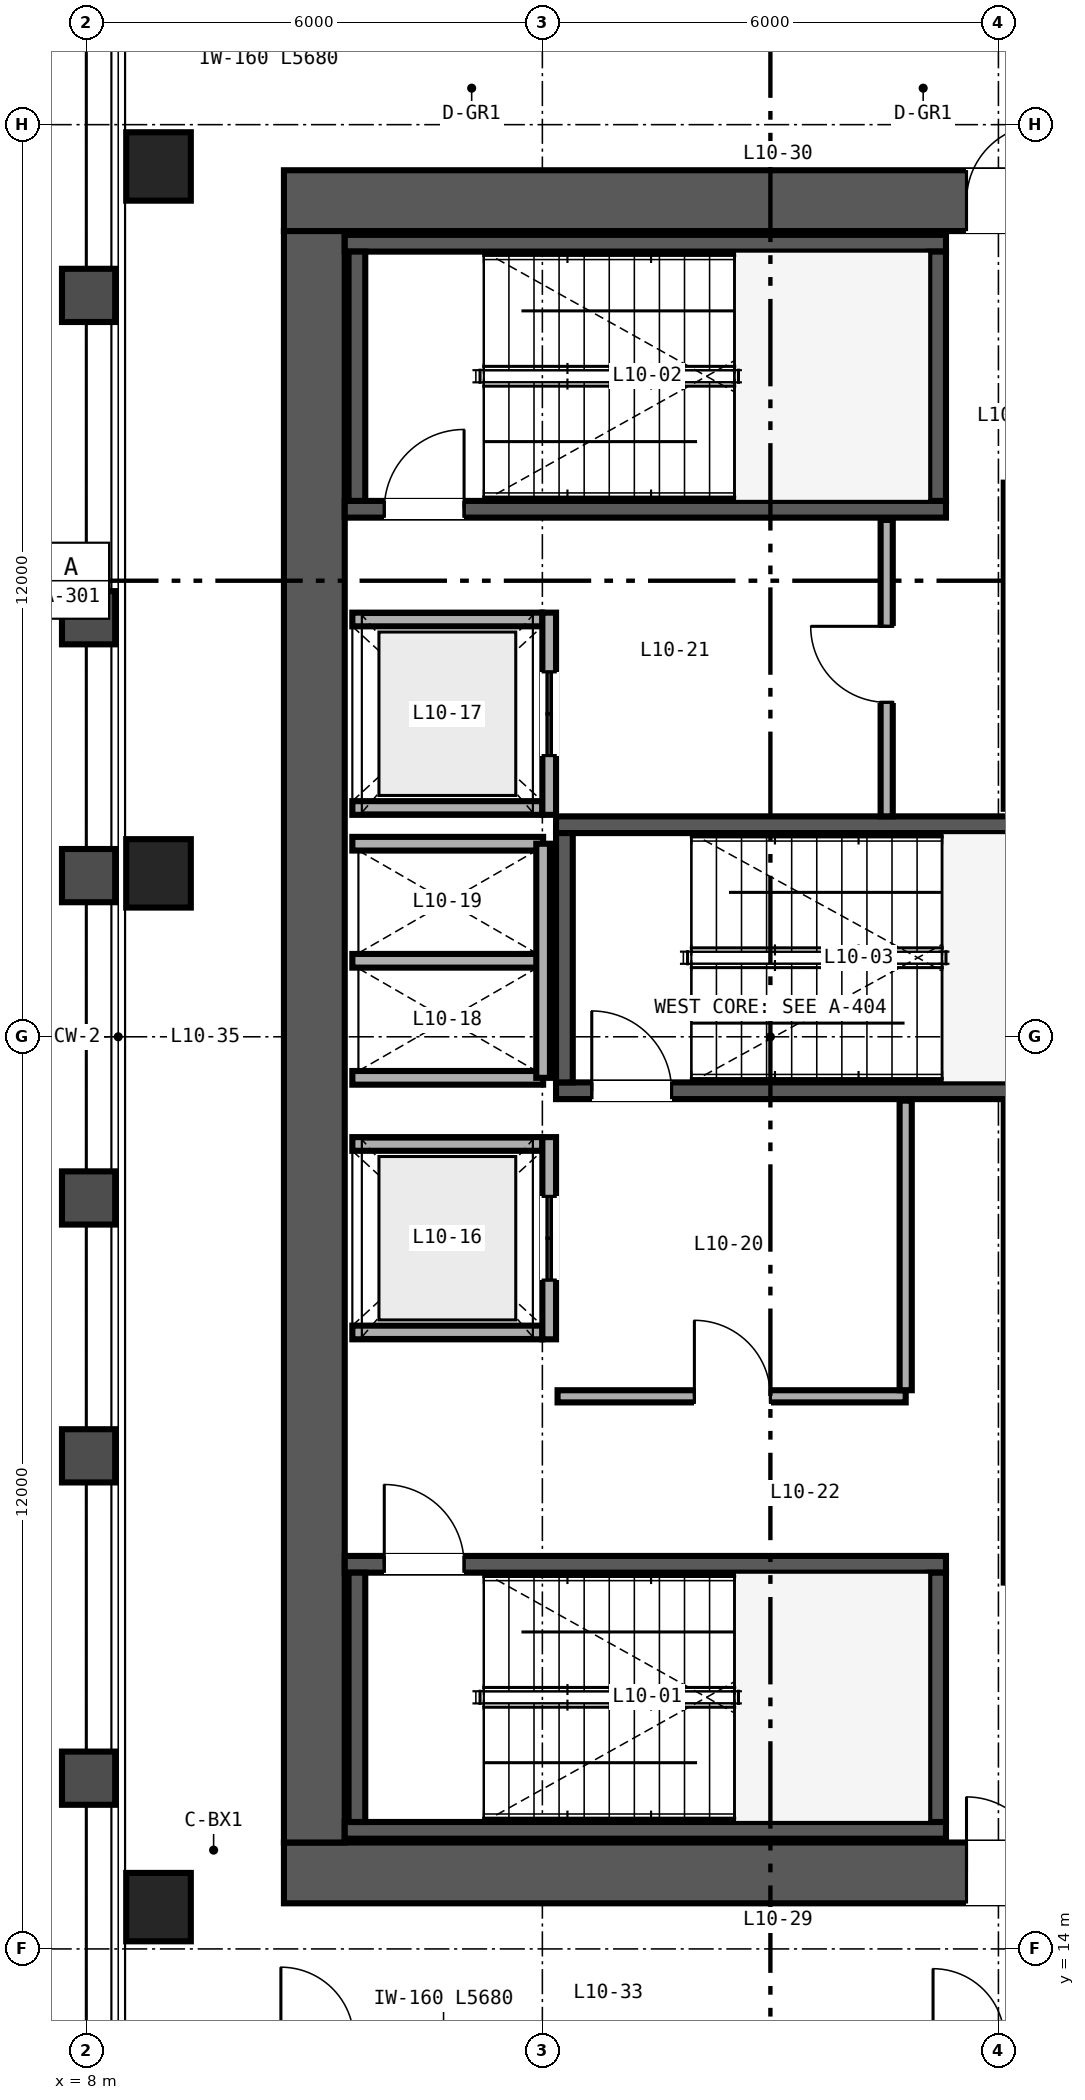
"""IFC4 building model, lengths in metres.
Left out: names, types, materials, properties, quantities, classifications, styles, units other than length and angle.
Written with IfcOpenShell. Run it as: python <this file> out.ifc"""

import sys

from ifc_helpers import new_model, si_unit, direction, frame, frame_2d, origin, origin_2d, place, context, subcontext, project, spatial, rectangle, hollow_rectangle, extrude, source, transform, mapped, element, fill, save


model = new_model("IFC4")
c1 = context("Model", 3, precision=1e-05, world=origin(), true_north=direction((0.0, 1.0)))
c2 = subcontext(c1, "Body", "Model", "MODEL_VIEW")
j1 = project(units=[si_unit("LENGTHUNIT", "METRE"), si_unit("PLANEANGLEUNIT", "RADIAN")], contexts=[c1])
p1 = place(None, origin())
s1 = spatial("IfcSite", under=j1, at=p1, CompositionType="ELEMENT")
p2 = place(p1, origin())
s2 = spatial("IfcBuilding", under=s1, at=p2, CompositionType="ELEMENT")
p3 = place(p2, frame((0.0, 0.0, 45.6)))
s3 = spatial("IfcBuildingStorey", under=s2, at=p3, CompositionType="ELEMENT", Elevation=45.6)
p4 = place(p3, frame((10.6, 15.0, 0.0), z_axis=(0.0, 0.0, 1.0), x_axis=(1.0, 0.0, 0.0)))
e1 = element("IfcWall", 1, at=p4, inside=s3, PredefinedType="SHEAR", context=c2, shape_type="SweptSolid", body=[
    extrude(rectangle(XDim=12.8, YDim=0.8, at=frame_2d((6.4, 0.0))), origin(), (0.0, 0.0, 1.0), 3.35),
])
p5 = place(p4, frame((8.98, 0.0, 0.0)))
e2 = element("IfcOpeningElement", 2, at=p5, cuts=e1, PredefinedType="OPENING", context=c2, shape_type="SweptSolid", body=[
    extrude(rectangle(XDim=1.0, YDim=2.15, at=frame_2d((0.5, 1.075))), frame((0.0, 0.41, 0.0), z_axis=(0.0, -1.0, 0.0), x_axis=(1.0, 0.0, 0.0)), (0.0, 0.0, 1.0), 0.82),
])
p6 = place(p3, frame((10.6, 37.0, 0.0), z_axis=(0.0, 0.0, 1.0), x_axis=(1.0, 0.0, 0.0)))
e3 = element("IfcWall", 3, at=p6, inside=s3, PredefinedType="SHEAR", context=c2, shape_type="SweptSolid", body=[
    extrude(rectangle(XDim=12.8, YDim=0.8, at=frame_2d((6.4, 0.0))), origin(), (0.0, 0.0, 1.0), 3.35),
])
p7 = place(p6, frame((8.98, 0.0, 0.0)))
e4 = element("IfcOpeningElement", 4, at=p7, cuts=e3, PredefinedType="OPENING", context=c2, shape_type="SweptSolid", body=[
    extrude(rectangle(XDim=1.0, YDim=2.15, at=frame_2d((0.5, 1.075))), frame((0.0, 0.41, 0.0), z_axis=(0.0, -1.0, 0.0), x_axis=(1.0, 0.0, 0.0)), (0.0, 0.0, 1.0), 0.82),
])
p8 = place(p3, frame((11.0, 15.4, 0.0), z_axis=(0.0, 0.0, 1.0), x_axis=(0.0, 1.0, 0.0)))
e5 = element("IfcWall", 5, at=p8, inside=s3, PredefinedType="SHEAR", context=c2, shape_type="SweptSolid", body=[
    extrude(rectangle(XDim=21.2, YDim=0.8, at=frame_2d((10.6, 0.0))), origin(), (0.0, 0.0, 1.0), 3.35),
])
p9 = place(p3, frame((11.4, 15.56, 0.0), z_axis=(0.0, 0.0, 1.0), x_axis=(1.0, 0.0, 0.0)))
e6 = element("IfcWall", 6, at=p9, inside=s3, PredefinedType="SHEAR", context=c2, shape_type="SweptSolid", body=[
    extrude(rectangle(XDim=7.91, YDim=0.22, at=frame_2d((3.955, 0.0))), origin(), (0.0, 0.0, 1.0), 3.4),
])
p10 = place(p3, frame((11.4, 19.06, 0.0), z_axis=(0.0, 0.0, 1.0), x_axis=(1.0, 0.0, 0.0)))
e7 = element("IfcWall", 7, at=p10, inside=s3, PredefinedType="SHEAR", context=c2, shape_type="SweptSolid", body=[
    extrude(rectangle(XDim=7.91, YDim=0.22, at=frame_2d((3.955, 0.0))), origin(), (0.0, 0.0, 1.0), 3.4),
])
p11 = place(p10, frame((0.52, 0.0, 0.0)))
e8 = element("IfcOpeningElement", 8, at=p11, cuts=e7, PredefinedType="OPENING", context=c2, shape_type="SweptSolid", body=[
    extrude(rectangle(XDim=1.05, YDim=2.15, at=frame_2d((0.525, 1.075))), frame((0.0, 0.12, 0.0), z_axis=(0.0, -1.0, 0.0), x_axis=(1.0, 0.0, 0.0)), (0.0, 0.0, 1.0), 0.24),
])
for number, where, z_axis, x_axis in (
    (9, (11.56, 15.67, 0.0), (0.0, 0.0, 1.0), (0.0, 1.0, 0.0)),
    (10, (19.2, 15.67, 0.0), (0.0, 0.0, 1.0), (0.0, 1.0, 0.0)),
):
    element("IfcWall", number, at=place(p3, frame(where, z_axis=z_axis, x_axis=x_axis)), inside=s3, PredefinedType="SHEAR", context=c2, shape_type="SweptSolid", body=[
        extrude(rectangle(XDim=3.28, YDim=0.22, at=frame_2d((1.64, 0.0))), origin(), (0.0, 0.0, 1.0), 3.4),
    ])
p12 = place(p3, frame((11.4, 32.94, 0.0), z_axis=(0.0, 0.0, 1.0), x_axis=(1.0, 0.0, 0.0)))
e11 = element("IfcWall", 11, at=p12, inside=s3, PredefinedType="SHEAR", context=c2, shape_type="SweptSolid", body=[
    extrude(rectangle(XDim=7.91, YDim=0.22, at=frame_2d((3.955, 0.0))), origin(), (0.0, 0.0, 1.0), 3.4),
])
p13 = place(p12, frame((0.52, 0.0, 0.0)))
e12 = element("IfcOpeningElement", 12, at=p13, cuts=e11, PredefinedType="OPENING", context=c2, shape_type="SweptSolid", body=[
    extrude(rectangle(XDim=1.05, YDim=2.15, at=frame_2d((0.525, 1.075))), frame((0.0, 0.12, 0.0), z_axis=(0.0, -1.0, 0.0), x_axis=(1.0, 0.0, 0.0)), (0.0, 0.0, 1.0), 0.24),
])
p14 = place(p3, frame((11.4, 36.44, 0.0), z_axis=(0.0, 0.0, 1.0), x_axis=(1.0, 0.0, 0.0)))
e13 = element("IfcWall", 13, at=p14, inside=s3, PredefinedType="SHEAR", context=c2, shape_type="SweptSolid", body=[
    extrude(rectangle(XDim=7.91, YDim=0.22, at=frame_2d((3.955, 0.0))), origin(), (0.0, 0.0, 1.0), 3.4),
])
for number, where, z_axis, x_axis in (
    (14, (11.56, 33.05, 0.0), (0.0, 0.0, 1.0), (0.0, 1.0, 0.0)),
    (15, (19.2, 33.05, 0.0), (0.0, 0.0, 1.0), (0.0, 1.0, 0.0)),
):
    element("IfcWall", number, at=place(p3, frame(where, z_axis=z_axis, x_axis=x_axis)), inside=s3, PredefinedType="SHEAR", context=c2, shape_type="SweptSolid", body=[
        extrude(rectangle(XDim=3.28, YDim=0.22, at=frame_2d((1.64, 0.0))), origin(), (0.0, 0.0, 1.0), 3.4),
    ])
p15 = place(p3, frame((14.18, 25.29, 0.0), z_axis=(0.0, 0.0, 1.0), x_axis=(1.0, 0.0, 0.0)))
e16 = element("IfcWall", 16, at=p15, inside=s3, PredefinedType="SHEAR", context=c2, shape_type="SweptSolid", body=[
    extrude(rectangle(XDim=8.42, YDim=0.22, at=frame_2d((4.21, 0.0))), origin(), (0.0, 0.0, 1.0), 3.4),
])
p16 = place(p15, frame((0.47, 0.0, 0.0)))
e17 = element("IfcOpeningElement", 17, at=p16, cuts=e16, PredefinedType="OPENING", context=c2, shape_type="SweptSolid", body=[
    extrude(rectangle(XDim=1.05, YDim=2.15, at=frame_2d((0.525, 1.075))), frame((0.0, 0.12, 0.0), z_axis=(0.0, -1.0, 0.0), x_axis=(1.0, 0.0, 0.0)), (0.0, 0.0, 1.0), 0.24),
])
p17 = place(p3, frame((14.18, 28.79, 0.0), z_axis=(0.0, 0.0, 1.0), x_axis=(1.0, 0.0, 0.0)))
e18 = element("IfcWall", 18, at=p17, inside=s3, PredefinedType="SHEAR", context=c2, shape_type="SweptSolid", body=[
    extrude(rectangle(XDim=8.42, YDim=0.22, at=frame_2d((4.21, 0.0))), origin(), (0.0, 0.0, 1.0), 3.4),
])
p18 = place(p3, frame((14.29, 25.4, 0.0), z_axis=(0.0, 0.0, 1.0), x_axis=(0.0, 1.0, 0.0)))
e19 = element("IfcWall", 19, at=p18, inside=s3, PredefinedType="SHEAR", context=c2, shape_type="SweptSolid", body=[
    extrude(rectangle(XDim=3.28, YDim=0.22, at=frame_2d((1.64, 0.0))), origin(), (0.0, 0.0, 1.0), 3.4),
])
m1 = source(origin(), c2, "Body", "SweptSolid", [
    extrude(hollow_rectangle(XDim=0.85, YDim=0.9, WallThickness=0.04, at=origin_2d()), origin(), (0.0, 0.0, 1.0), 3.35),
])
for number, where, z_axis, x_axis in (
    (20, (8.95, 14.55, 0.0), (0.0, 0.0, 1.0), (1.0, 0.0, 0.0)),
    (21, (8.95, 28.15, 0.0), (0.0, 0.0, 1.0), (1.0, 0.0, 0.0)),
    (22, (8.95, 37.45, 0.0), (0.0, 0.0, 1.0), (1.0, 0.0, 0.0)),
):
    element("IfcColumn", number, at=place(p3, frame(where, z_axis=z_axis, x_axis=x_axis)), inside=s3, PredefinedType="COLUMN", context=c2, shape_type="MappedRepresentation", body=[
        mapped(m1, transform((0.0, 0.0, 0.0), scale=1.0)),
    ])
p19 = place(p3, frame((20.16, 18.82, 0.0), z_axis=(0.0, 0.0, 1.0), x_axis=(0.0, 1.0, 0.0)))
e23 = element("IfcWall", 23, at=p19, inside=s3, PredefinedType="SOLIDWALL", context=c2, shape_type="SweptSolid", body=[
    extrude(rectangle(XDim=6.32, YDim=0.18, at=frame_2d((3.16, 0.0))), origin(), (0.0, 0.0, 1.0), 2.36),
])
p20 = place(p3, frame((20.16, 29.0, 0.0), z_axis=(0.0, 0.0, 1.0), x_axis=(0.0, 1.0, 0.0)))
e24 = element("IfcWall", 24, at=p20, inside=s3, PredefinedType="SOLIDWALL", context=c2, shape_type="SweptSolid", body=[
    extrude(rectangle(XDim=4.29, YDim=0.18, at=frame_2d((2.145, 0.0))), origin(), (0.0, 0.0, 1.0), 3.35),
])
for number, where, z_axis, x_axis in (
    (25, (11.5, 22.11, 0.0), (0.0, 0.0, 1.0), (1.0, 0.0, 0.0)),
    (26, (11.5, 24.59, 0.0), (0.0, 0.0, 1.0), (1.0, 0.0, 0.0)),
):
    element("IfcWall", number, at=place(p3, frame(where, z_axis=z_axis, x_axis=x_axis)), inside=s3, PredefinedType="SOLIDWALL", context=c2, shape_type="SweptSolid", body=[
        extrude(rectangle(XDim=2.5, YDim=0.18, at=frame_2d((1.25, 0.0))), origin(), (0.0, 0.0, 1.0), 3.35),
    ])
p21 = place(p3, frame((14.09, 22.02, 0.0), z_axis=(0.0, 0.0, 1.0), x_axis=(0.0, 1.0, 0.0)))
e27 = element("IfcWall", 27, at=p21, inside=s3, PredefinedType="SOLIDWALL", context=c2, shape_type="SweptSolid", body=[
    extrude(rectangle(XDim=2.66, YDim=0.18, at=frame_2d((1.33, 0.0))), origin(), (0.0, 0.0, 1.0), 3.35),
])
p22 = place(p21, frame((0.78, 0.0, 0.0)))
e28 = element("IfcOpeningElement", 28, at=p22, cuts=e27, PredefinedType="OPENING", context=c2, shape_type="SweptSolid", body=[
    extrude(rectangle(XDim=1.1, YDim=2.2, at=frame_2d((0.55, 1.1))), frame((0.0, 0.1, 0.0), z_axis=(0.0, -1.0, 0.0), x_axis=(1.0, 0.0, 0.0)), (0.0, 0.0, 1.0), 0.2),
])
for number, where, z_axis, x_axis in (
    (29, (11.5, 29.01, 0.0), (0.0, 0.0, 1.0), (1.0, 0.0, 0.0)),
    (30, (11.5, 31.49, 0.0), (0.0, 0.0, 1.0), (1.0, 0.0, 0.0)),
):
    element("IfcWall", number, at=place(p3, frame(where, z_axis=z_axis, x_axis=x_axis)), inside=s3, PredefinedType="SOLIDWALL", context=c2, shape_type="SweptSolid", body=[
        extrude(rectangle(XDim=2.5, YDim=0.18, at=frame_2d((1.25, 0.0))), origin(), (0.0, 0.0, 1.0), 3.35),
    ])
p23 = place(p3, frame((14.09, 28.92, 0.0), z_axis=(0.0, 0.0, 1.0), x_axis=(0.0, 1.0, 0.0)))
e31 = element("IfcWall", 31, at=p23, inside=s3, PredefinedType="SOLIDWALL", context=c2, shape_type="SweptSolid", body=[
    extrude(rectangle(XDim=2.66, YDim=0.18, at=frame_2d((1.33, 0.0))), origin(), (0.0, 0.0, 1.0), 3.35),
])
p24 = place(p23, frame((0.78, 0.0, 0.0)))
e32 = element("IfcOpeningElement", 32, at=p24, cuts=e31, PredefinedType="OPENING", context=c2, shape_type="SweptSolid", body=[
    extrude(rectangle(XDim=1.1, YDim=2.2, at=frame_2d((0.55, 1.1))), frame((0.0, 0.1, 0.0), z_axis=(0.0, -1.0, 0.0), x_axis=(1.0, 0.0, 0.0)), (0.0, 0.0, 1.0), 0.2),
])
for number, where, z_axis, x_axis in (
    (33, (11.5, 25.46, 0.0), (0.0, 0.0, 1.0), (1.0, 0.0, 0.0)),
    (34, (11.5, 27.0, 0.0), (0.0, 0.0, 1.0), (1.0, 0.0, 0.0)),
    (35, (11.5, 28.54, 0.0), (0.0, 0.0, 1.0), (1.0, 0.0, 0.0)),
):
    element("IfcWall", number, at=place(p3, frame(where, z_axis=z_axis, x_axis=x_axis)), inside=s3, PredefinedType="SOLIDWALL", context=c2, shape_type="SweptSolid", body=[
        extrude(rectangle(XDim=2.51, YDim=0.18, at=frame_2d((1.255, 0.0))), origin(), (0.0, 0.0, 1.0), 3.35),
    ])
p25 = place(p3, frame((14.01, 25.46, 0.0), z_axis=(0.0, 0.0, 1.0), x_axis=(0.0, 1.0, 0.0)))
e36 = element("IfcWall", 36, at=p25, inside=s3, PredefinedType="SOLIDWALL", context=c2, shape_type="SweptSolid", body=[
    extrude(rectangle(XDim=3.08, YDim=0.18, at=frame_2d((1.54, 0.0))), origin(), (0.0, 0.0, 1.0), 3.35),
])
p26 = place(p3, frame((14.2, 21.27, 0.0), z_axis=(0.0, 0.0, 1.0), x_axis=(1.0, 0.0, 0.0)))
e37 = element("IfcWall", 37, at=p26, inside=s3, PredefinedType="PARTITIONING", context=c2, shape_type="SweptSolid", body=[
    extrude(rectangle(XDim=4.58, YDim=0.16, at=frame_2d((2.29, 0.0))), origin(), (0.0, 0.0, 1.0), 3.35),
])
p27 = place(p26, frame((1.8, 0.0, 0.0)))
e38 = element("IfcOpeningElement", 38, at=p27, cuts=e37, PredefinedType="OPENING", context=c2, shape_type="SweptSolid", body=[
    extrude(rectangle(XDim=1.0, YDim=2.15, at=frame_2d((0.5, 1.075))), frame((0.0, 0.09, 0.0), z_axis=(0.0, -1.0, 0.0), x_axis=(1.0, 0.0, 0.0)), (0.0, 0.0, 1.0), 0.18),
])
p28 = place(p3, frame((18.78, 21.35, 0.0), z_axis=(0.0, 0.0, 1.0), x_axis=(0.0, 1.0, 0.0)))
e39 = element("IfcWall", 39, at=p28, inside=s3, PredefinedType="PARTITIONING", context=c2, shape_type="SweptSolid", body=[
    extrude(rectangle(XDim=3.81, YDim=0.16, at=frame_2d((1.905, 0.0))), origin(), (0.0, 0.0, 1.0), 3.35),
])
p29 = place(p3, frame((18.53, 28.9, 0.0), z_axis=(0.0, 0.0, 1.0), x_axis=(0.0, 1.0, 0.0)))
e40 = element("IfcWall", 40, at=p29, inside=s3, PredefinedType="PARTITIONING", context=c2, shape_type="SweptSolid", body=[
    extrude(rectangle(XDim=3.9, YDim=0.16, at=frame_2d((1.95, 0.0))), origin(), (0.0, 0.0, 1.0), 3.35),
])
p30 = place(p29, frame((1.5, 0.0, 0.0)))
e41 = element("IfcOpeningElement", 41, at=p30, cuts=e40, PredefinedType="OPENING", context=c2, shape_type="SweptSolid", body=[
    extrude(rectangle(XDim=1.0, YDim=2.15, at=frame_2d((0.5, 1.075))), frame((0.0, 0.09, 0.0), z_axis=(0.0, -1.0, 0.0), x_axis=(1.0, 0.0, 0.0)), (0.0, 0.0, 1.0), 0.18),
])
m2 = source(origin(), c2, "Body", "SweptSolid", [
    extrude(rectangle(XDim=1.05, YDim=2.15, at=frame_2d((0.525, 1.075))), frame((0.0, 0.025, 0.0), z_axis=(0.0, -1.0, 0.0), x_axis=(1.0, 0.0, 0.0)), (0.0, 0.0, 1.0), 0.05),
])
p31 = place(p11, origin())
e42 = element("IfcDoor", 42, at=p31, inside=s3, OperationType="SINGLE_SWING_LEFT", PredefinedType="DOOR", context=c2, shape_type="MappedRepresentation", body=[
    mapped(m2, transform((0.0, 0.0, 0.0), scale=1.0)),
])
fill(e8, e42)
p32 = place(p13, origin())
e43 = element("IfcDoor", 43, at=p32, inside=s3, OperationType="SINGLE_SWING_RIGHT", PredefinedType="DOOR", context=c2, shape_type="MappedRepresentation", body=[
    mapped(m2, transform((0.0, 0.0, 0.0), scale=1.0)),
])
fill(e12, e43)
p33 = place(p16, origin())
e44 = element("IfcDoor", 44, at=p33, inside=s3, OperationType="SINGLE_SWING_LEFT", PredefinedType="DOOR", context=c2, shape_type="MappedRepresentation", body=[
    mapped(m2, transform((0.0, 0.0, 0.0), scale=1.0)),
])
fill(e17, e44)
m3 = source(origin(), c2, "Body", "SweptSolid", [
    extrude(rectangle(XDim=1.1, YDim=2.2, at=frame_2d((0.55, 1.1))), frame((0.0, 0.025, 0.0), z_axis=(0.0, -1.0, 0.0), x_axis=(1.0, 0.0, 0.0)), (0.0, 0.0, 1.0), 0.05),
])
p34 = place(p22, origin())
e45 = element("IfcDoor", 45, at=p34, inside=s3, OperationType="DOUBLE_DOOR_SLIDING", PredefinedType="DOOR", context=c2, shape_type="MappedRepresentation", body=[
    mapped(m3, transform((0.0, 0.0, 0.0), scale=1.0)),
])
fill(e28, e45)
p35 = place(p24, origin())
e46 = element("IfcDoor", 46, at=p35, inside=s3, OperationType="DOUBLE_DOOR_SLIDING", PredefinedType="DOOR", context=c2, shape_type="MappedRepresentation", body=[
    mapped(m3, transform((0.0, 0.0, 0.0), scale=1.0)),
])
fill(e32, e46)
m4 = source(origin(), c2, "Body", "SweptSolid", [
    extrude(rectangle(XDim=1.0, YDim=2.15, at=frame_2d((0.5, 1.075))), frame((0.0, 0.025, 0.0), z_axis=(0.0, -1.0, 0.0), x_axis=(1.0, 0.0, 0.0)), (0.0, 0.0, 1.0), 0.05),
])
p36 = place(p27, origin())
e47 = element("IfcDoor", 47, at=p36, inside=s3, OperationType="SINGLE_SWING_LEFT", PredefinedType="DOOR", context=c2, shape_type="MappedRepresentation", body=[
    mapped(m4, transform((0.0, 0.0, 0.0), scale=1.0)),
])
fill(e38, e47)
p37 = place(p30, origin())
e48 = element("IfcDoor", 48, at=p37, inside=s3, OperationType="SINGLE_SWING_RIGHT", PredefinedType="DOOR", context=c2, shape_type="MappedRepresentation", body=[
    mapped(m4, transform((0.0, 0.0, 0.0), scale=1.0)),
])
fill(e41, e48)
p38 = place(p5, origin())
e49 = element("IfcDoor", 49, at=p38, inside=s3, OperationType="SINGLE_SWING_LEFT", PredefinedType="DOOR", context=c2, shape_type="MappedRepresentation", body=[
    mapped(m4, transform((0.0, 0.0, 0.0), scale=1.0)),
])
fill(e2, e49)
p39 = place(p7, origin())
e50 = element("IfcDoor", 50, at=p39, inside=s3, OperationType="SINGLE_SWING_RIGHT", PredefinedType="DOOR", context=c2, shape_type="MappedRepresentation", body=[
    mapped(m4, transform((0.0, 0.0, 0.0), scale=1.0)),
])
fill(e4, e50)
save(model, sys.argv[1])
